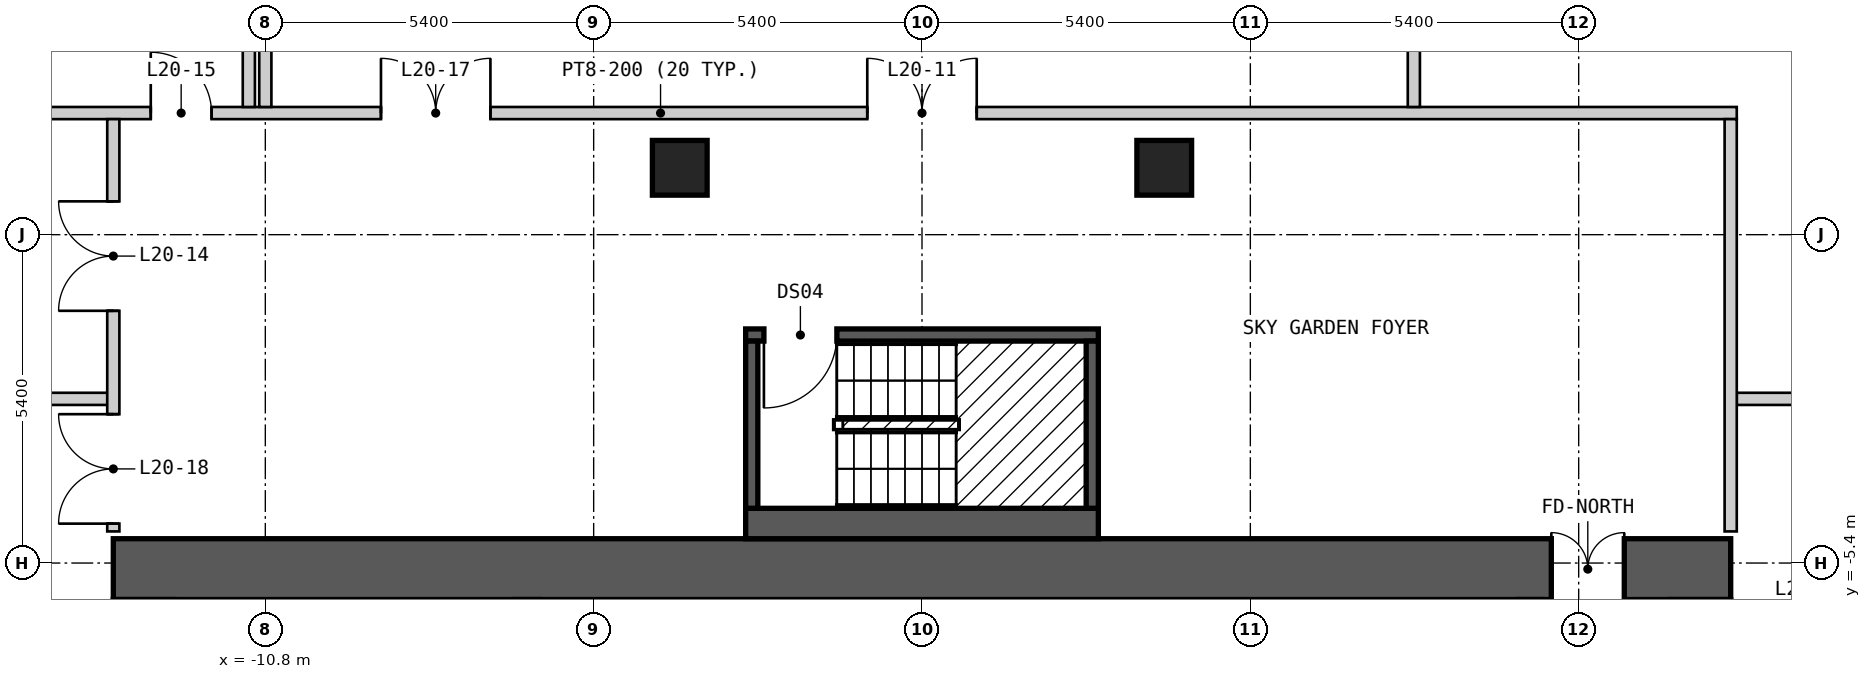
"""IFC4 building model, lengths in metres.
Left out: names, types, materials, properties, quantities, classifications, styles, units other than length and angle.
Written with IfcOpenShell. Run it as: python <this file> out.ifc"""

import sys

from ifc_helpers import new_model, si_unit, direction, frame, frame_2d, origin, origin_2d, place, context, subcontext, project, spatial, rectangle, extrude, element, fill, save


model = new_model("IFC4")
c1 = context("Model", 3, precision=1e-05, world=origin(), true_north=direction((0.0, 1.0)))
c2 = subcontext(c1, "Body", "Model", "MODEL_VIEW")
j1 = project(units=[si_unit("LENGTHUNIT", "METRE"), si_unit("PLANEANGLEUNIT", "RADIAN")], contexts=[c1])
p1 = place(None, origin())
s1 = spatial("IfcSite", under=j1, at=p1, CompositionType="ELEMENT")
p2 = place(p1, origin())
s2 = spatial("IfcBuilding", under=s1, at=p2, CompositionType="ELEMENT")
p3 = place(p2, frame((0.0, 0.0, 66.0)))
s3 = spatial("IfcBuildingStorey", under=s2, at=p3, CompositionType="ELEMENT", Elevation=66.0)
for number, where, z_axis, x_axis in (
    (1, (3.984, 1.1, 0.0), (0.0, 0.0, 1.0), (1.0, 0.0, 0.0)),
    (2, (-3.984, 1.1, 0.0), (0.0, 0.0, 1.0), (1.0, 0.0, 0.0)),
):
    element("IfcColumn", number, at=place(p3, frame(where, z_axis=z_axis, x_axis=x_axis)), inside=s3, PredefinedType="COLUMN", context=c2, shape_type="SweptSolid", body=[
        extrude(rectangle(XDim=0.9, YDim=0.9, at=origin_2d()), origin(), (0.0, 0.0, 1.0), 6.0),
    ])
p4 = place(p3, frame((-13.3, -5.5, 0.0), z_axis=(0.0, 0.0, 1.0), x_axis=(1.0, 0.0, 0.0)))
e3 = element("IfcWall", 3, at=p4, inside=s3, PredefinedType="SHEAR", context=c2, shape_type="SweptSolid", body=[
    extrude(rectangle(XDim=26.6, YDim=1.0, at=frame_2d((13.3, 0.0))), origin(), (0.0, 0.0, 1.0), 5.7),
])
p5 = place(p4, frame((23.65, 0.0, 0.0)))
e4 = element("IfcOpeningElement", 4, at=p5, cuts=e3, PredefinedType="OPENING", context=c2, shape_type="SweptSolid", body=[
    extrude(rectangle(XDim=1.2, YDim=2.1, at=frame_2d((0.6, 1.05))), frame((0.0, 0.51, 0.0), z_axis=(0.0, -1.0, 0.0), x_axis=(1.0, 0.0, 0.0)), (0.0, 0.0, 1.0), 1.02),
])
p6 = place(p3, frame((-2.9, -4.75, 0.0), z_axis=(0.0, 0.0, 1.0), x_axis=(1.0, 0.0, 0.0)))
e5 = element("IfcWall", 5, at=p6, inside=s3, PredefinedType="SOLIDWALL", context=c2, shape_type="SweptSolid", body=[
    extrude(rectangle(XDim=5.8, YDim=0.5, at=frame_2d((2.9, 0.0))), origin(), (0.0, 0.0, 1.0), 5.7),
])
p7 = place(p3, frame((-2.9, -1.65, 0.0), z_axis=(0.0, 0.0, 1.0), x_axis=(1.0, 0.0, 0.0)))
e6 = element("IfcWall", 6, at=p7, inside=s3, PredefinedType="SOLIDWALL", context=c2, shape_type="SweptSolid", body=[
    extrude(rectangle(XDim=5.8, YDim=0.2, at=frame_2d((2.9, 0.0))), origin(), (0.0, 0.0, 1.0), 5.7),
])
p8 = place(p7, frame((0.3, 0.0, 0.0)))
e7 = element("IfcOpeningElement", 7, at=p8, cuts=e6, PredefinedType="OPENING", context=c2, shape_type="SweptSolid", body=[
    extrude(rectangle(XDim=1.2, YDim=2.1, at=frame_2d((0.6, 1.05))), frame((0.0, 0.11, 0.0), z_axis=(0.0, -1.0, 0.0), x_axis=(1.0, 0.0, 0.0)), (0.0, 0.0, 1.0), 0.22),
])
for number, where, z_axis, x_axis in (
    (8, (-2.8, -4.5, 0.0), (0.0, 0.0, 1.0), (0.0, 1.0, 0.0)),
    (9, (2.8, -4.5, 0.0), (0.0, 0.0, 1.0), (0.0, 1.0, 0.0)),
):
    element("IfcWall", number, at=place(p3, frame(where, z_axis=z_axis, x_axis=x_axis)), inside=s3, PredefinedType="SOLIDWALL", context=c2, shape_type="SweptSolid", body=[
        extrude(rectangle(XDim=2.75, YDim=0.2, at=frame_2d((1.375, 0.0))), origin(), (0.0, 0.0, 1.0), 5.7),
    ])
for number, where, z_axis, x_axis in (
    (10, (-15.6, -2.7, 0.0), (0.0, 0.0, 1.0), (1.0, 0.0, 0.0)),
    (11, (13.4, -2.7, 0.0), (0.0, 0.0, 1.0), (1.0, 0.0, 0.0)),
):
    element("IfcWall", number, at=place(p3, frame(where, z_axis=z_axis, x_axis=x_axis)), inside=s3, PredefinedType="PARTITIONING", context=c2, shape_type="SweptSolid", body=[
        extrude(rectangle(XDim=2.3, YDim=0.2, at=frame_2d((1.15, 0.0))), origin(), (0.0, 0.0, 1.0), 5.7),
    ])
p9 = place(p3, frame((-22.0, 2.0, 0.0), z_axis=(0.0, 0.0, 1.0), x_axis=(1.0, 0.0, 0.0)))
e12 = element("IfcWall", 12, at=p9, inside=s3, PredefinedType="PARTITIONING", context=c2, shape_type="SweptSolid", body=[
    extrude(rectangle(XDim=35.4, YDim=0.2, at=frame_2d((17.7, 0.0))), origin(), (0.0, 0.0, 1.0), 5.7),
])
p10 = place(p9, frame((3.89, 0.0, 0.0), z_axis=(0.0, 0.0, 1.0), x_axis=(-1.0, 0.0, 0.0)))
e13 = element("IfcOpeningElement", 13, at=p10, cuts=e12, PredefinedType="OPENING", context=c2, shape_type="SweptSolid", body=[
    extrude(rectangle(XDim=1.0, YDim=2.1, at=frame_2d((0.5, 1.05))), frame((0.0, 0.11, 0.0), z_axis=(0.0, -1.0, 0.0), x_axis=(1.0, 0.0, 0.0)), (0.0, 0.0, 1.0), 0.22),
])
p11 = place(p9, frame((21.1, 0.0, 0.0)))
e14 = element("IfcOpeningElement", 14, at=p11, cuts=e12, PredefinedType="OPENING", context=c2, shape_type="SweptSolid", body=[
    extrude(rectangle(XDim=1.8, YDim=2.1, at=frame_2d((0.9, 1.05))), frame((0.0, 0.11, 0.0), z_axis=(0.0, -1.0, 0.0), x_axis=(1.0, 0.0, 0.0)), (0.0, 0.0, 1.0), 0.22),
])
p12 = place(p9, frame((9.316, 0.0, 0.0)))
e15 = element("IfcOpeningElement", 15, at=p12, cuts=e12, PredefinedType="OPENING", context=c2, shape_type="SweptSolid", body=[
    extrude(rectangle(XDim=1.0, YDim=2.1, at=frame_2d((0.5, 1.05))), frame((0.0, 0.11, 0.0), z_axis=(0.0, -1.0, 0.0), x_axis=(1.0, 0.0, 0.0)), (0.0, 0.0, 1.0), 0.22),
])
p13 = place(p9, frame((13.102, 0.0, 0.0)))
e16 = element("IfcOpeningElement", 16, at=p13, cuts=e12, PredefinedType="OPENING", context=c2, shape_type="SweptSolid", body=[
    extrude(rectangle(XDim=1.8, YDim=2.1, at=frame_2d((0.9, 1.05))), frame((0.0, 0.11, 0.0), z_axis=(0.0, -1.0, 0.0), x_axis=(1.0, 0.0, 0.0)), (0.0, 0.0, 1.0), 0.22),
])
p14 = place(p3, frame((-13.3, -4.88, 0.0), z_axis=(0.0, 0.0, 1.0), x_axis=(0.0, 1.0, 0.0)))
e17 = element("IfcWall", 17, at=p14, inside=s3, PredefinedType="PARTITIONING", context=c2, shape_type="SweptSolid", body=[
    extrude(rectangle(XDim=6.78, YDim=0.2, at=frame_2d((3.39, 0.0))), origin(), (0.0, 0.0, 1.0), 5.7),
])
p15 = place(p14, frame((3.628, 0.0, 0.0)))
e18 = element("IfcOpeningElement", 18, at=p15, cuts=e17, PredefinedType="OPENING", context=c2, shape_type="SweptSolid", body=[
    extrude(rectangle(XDim=1.8, YDim=2.1, at=frame_2d((0.9, 1.05))), frame((0.0, 0.11, 0.0), z_axis=(0.0, -1.0, 0.0), x_axis=(1.0, 0.0, 0.0)), (0.0, 0.0, 1.0), 0.22),
])
p16 = place(p14, frame((0.128, 0.0, 0.0)))
e19 = element("IfcOpeningElement", 19, at=p16, cuts=e17, PredefinedType="OPENING", context=c2, shape_type="SweptSolid", body=[
    extrude(rectangle(XDim=1.8, YDim=2.1, at=frame_2d((0.9, 1.05))), frame((0.0, 0.11, 0.0), z_axis=(0.0, -1.0, 0.0), x_axis=(1.0, 0.0, 0.0)), (0.0, 0.0, 1.0), 0.22),
])
p17 = place(p3, frame((-11.071, 2.1, 0.0), z_axis=(0.0, 0.0, 1.0), x_axis=(0.0, 1.0, 0.0)))
e20 = element("IfcWall", 20, at=p17, inside=s3, PredefinedType="PARTITIONING", context=c2, shape_type="SweptSolid", body=[
    extrude(rectangle(XDim=3.454, YDim=0.2, at=frame_2d((1.727, 0.0))), origin(), (0.0, 0.0, 1.0), 5.7),
])
p18 = place(p3, frame((-10.8, 2.1, 0.0), z_axis=(0.0, 0.0, 1.0), x_axis=(0.0, 1.0, 0.0)))
e21 = element("IfcWall", 21, at=p18, inside=s3, PredefinedType="PARTITIONING", context=c2, shape_type="SweptSolid", body=[
    extrude(rectangle(XDim=8.8, YDim=0.2, at=frame_2d((4.4, 0.0))), origin(), (0.0, 0.0, 1.0), 5.7),
])
p19 = place(p3, frame((8.089, 2.1, 0.0), z_axis=(0.0, 0.0, 1.0), x_axis=(0.0, 1.0, 0.0)))
e22 = element("IfcWall", 22, at=p19, inside=s3, PredefinedType="PARTITIONING", context=c2, shape_type="SweptSolid", body=[
    extrude(rectangle(XDim=2.594, YDim=0.2, at=frame_2d((1.297, 0.0))), origin(), (0.0, 0.0, 1.0), 5.7),
])
p20 = place(p3, frame((13.3, -4.88, 0.0), z_axis=(0.0, 0.0, 1.0), x_axis=(0.0, 1.0, 0.0)))
e23 = element("IfcWall", 23, at=p20, inside=s3, PredefinedType="PARTITIONING", context=c2, shape_type="SweptSolid", body=[
    extrude(rectangle(XDim=6.78, YDim=0.2, at=frame_2d((3.39, 0.0))), origin(), (0.0, 0.0, 1.0), 5.7),
])
p21 = place(p8, origin())
e24 = element("IfcDoor", 24, at=p21, inside=s3, OperationType="SINGLE_SWING_LEFT", PredefinedType="DOOR", context=c2, shape_type="SweptSolid", body=[
    extrude(rectangle(XDim=1.2, YDim=2.1, at=frame_2d((0.6, 1.05))), frame((0.0, 0.025, 0.0), z_axis=(0.0, -1.0, 0.0), x_axis=(1.0, 0.0, 0.0)), (0.0, 0.0, 1.0), 0.05),
])
fill(e7, e24)
p22 = place(p11, origin())
e25 = element("IfcDoor", 25, at=p22, inside=s3, OperationType="DOUBLE_DOOR_SINGLE_SWING", PredefinedType="DOOR", context=c2, shape_type="SweptSolid", body=[
    extrude(rectangle(XDim=1.8, YDim=2.1, at=frame_2d((0.9, 1.05))), frame((0.0, 0.025, 0.0), z_axis=(0.0, -1.0, 0.0), x_axis=(1.0, 0.0, 0.0)), (0.0, 0.0, 1.0), 0.05),
])
fill(e14, e25)
p23 = place(p15, origin())
e26 = element("IfcDoor", 26, at=p23, inside=s3, OperationType="DOUBLE_DOOR_SINGLE_SWING", PredefinedType="DOOR", context=c2, shape_type="SweptSolid", body=[
    extrude(rectangle(XDim=1.8, YDim=2.1, at=frame_2d((0.9, 1.05))), frame((0.0, 0.025, 0.0), z_axis=(0.0, -1.0, 0.0), x_axis=(1.0, 0.0, 0.0)), (0.0, 0.0, 1.0), 0.05),
])
fill(e18, e26)
p24 = place(p12, origin())
e27 = element("IfcDoor", 27, at=p24, inside=s3, OperationType="SINGLE_SWING_LEFT", PredefinedType="DOOR", context=c2, shape_type="SweptSolid", body=[
    extrude(rectangle(XDim=1.0, YDim=2.1, at=frame_2d((0.5, 1.05))), frame((0.0, 0.025, 0.0), z_axis=(0.0, -1.0, 0.0), x_axis=(1.0, 0.0, 0.0)), (0.0, 0.0, 1.0), 0.05),
])
fill(e15, e27)
p25 = place(p13, origin())
e28 = element("IfcDoor", 28, at=p25, inside=s3, OperationType="DOUBLE_DOOR_SINGLE_SWING", PredefinedType="DOOR", context=c2, shape_type="SweptSolid", body=[
    extrude(rectangle(XDim=1.8, YDim=2.1, at=frame_2d((0.9, 1.05))), frame((0.0, 0.025, 0.0), z_axis=(0.0, -1.0, 0.0), x_axis=(1.0, 0.0, 0.0)), (0.0, 0.0, 1.0), 0.05),
])
fill(e16, e28)
p26 = place(p16, origin())
e29 = element("IfcDoor", 29, at=p26, inside=s3, OperationType="DOUBLE_DOOR_SINGLE_SWING", PredefinedType="DOOR", context=c2, shape_type="SweptSolid", body=[
    extrude(rectangle(XDim=1.8, YDim=2.1, at=frame_2d((0.9, 1.05))), frame((0.0, 0.025, 0.0), z_axis=(0.0, -1.0, 0.0), x_axis=(1.0, 0.0, 0.0)), (0.0, 0.0, 1.0), 0.05),
])
fill(e19, e29)
p27 = place(p5, origin())
e30 = element("IfcDoor", 30, at=p27, inside=s3, OperationType="DOUBLE_DOOR_SINGLE_SWING", PredefinedType="DOOR", context=c2, shape_type="SweptSolid", body=[
    extrude(rectangle(XDim=1.2, YDim=2.1, at=frame_2d((0.6, 1.05))), frame((0.0, 0.025, 0.0), z_axis=(0.0, -1.0, 0.0), x_axis=(1.0, 0.0, 0.0)), (0.0, 0.0, 1.0), 0.05),
])
fill(e4, e30)
save(model, sys.argv[1])
